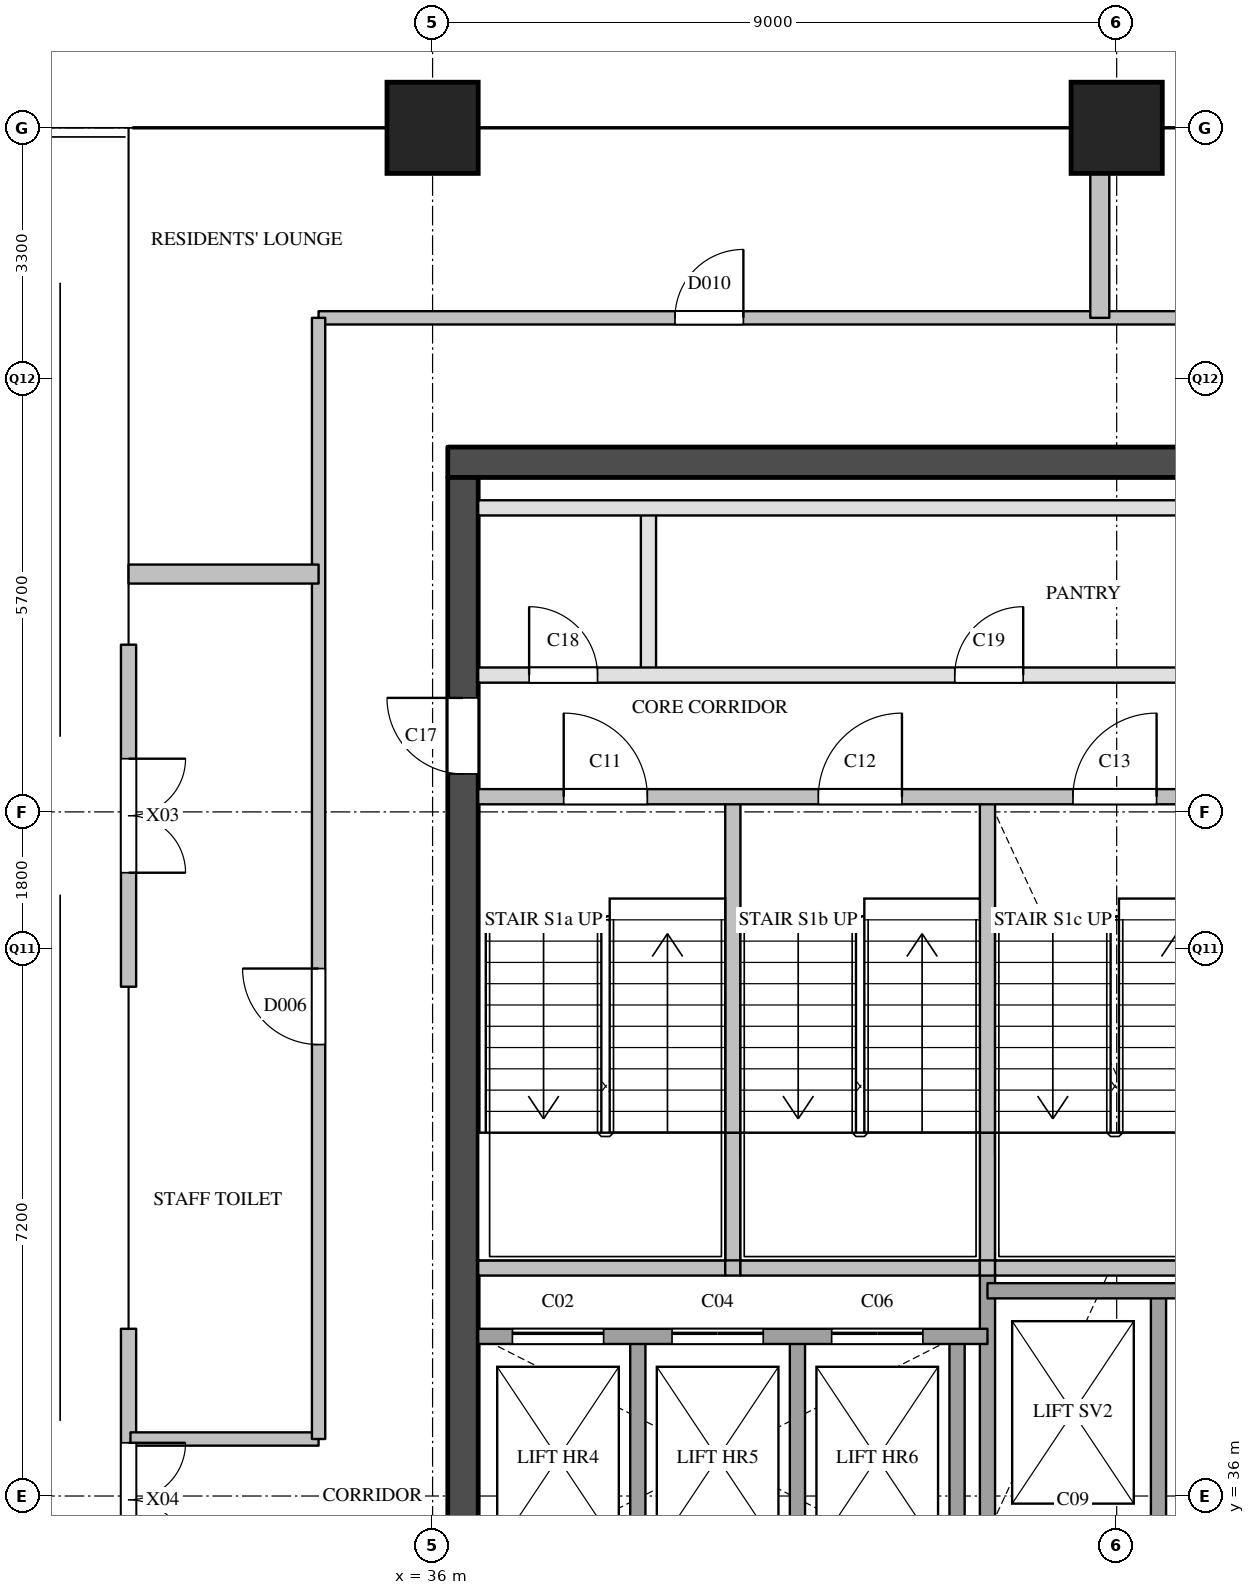
"""IFC4 building model, lengths in metres.
Left out: names, types, materials, properties, quantities, classifications, styles, units other than length and angle.
Written with IfcOpenShell. Run it as: python <this file> out.ifc"""

import sys

from ifc_helpers import new_model, si_unit, direction, frame, frame_2d, origin, origin_2d, place, context, subcontext, project, spatial, rectangle, extrude, element, fill, save


model = new_model("IFC4")
c1 = context("Model", 3, precision=1e-05, world=origin(), true_north=direction((0.0, 1.0)))
c2 = subcontext(c1, "Body", "Model", "MODEL_VIEW")
j1 = project(units=[si_unit("LENGTHUNIT", "METRE"), si_unit("PLANEANGLEUNIT", "RADIAN")], contexts=[c1])
p1 = place(None, origin())
s1 = spatial("IfcSite", under=j1, at=p1, CompositionType="ELEMENT")
p2 = place(p1, origin())
s2 = spatial("IfcBuilding", under=s1, at=p2, CompositionType="ELEMENT")
p3 = place(p2, frame((0.0, 0.0, 203.3)))
s3 = spatial("IfcBuildingStorey", under=s2, at=p3, CompositionType="ELEMENT", Elevation=203.3)
for number, where, z_axis, x_axis in (
    (1, (36.0, 54.0, 0.0), (0.0, 0.0, 1.0), (1.0, 0.0, 0.0)),
    (2, (45.0, 54.0, 0.0), (0.0, 0.0, 1.0), (1.0, 0.0, 0.0)),
):
    element("IfcColumn", number, at=place(p3, frame(where, z_axis=z_axis, x_axis=x_axis)), inside=s3, PredefinedType="COLUMN", context=c2, shape_type="SweptSolid", body=[
        extrude(rectangle(XDim=1.2, YDim=1.2, at=origin_2d()), origin(), (0.0, 0.0, 1.0), 3.9),
    ])
p4 = place(p3, frame((32.0, 47.2, 0.0), z_axis=(0.0, 0.0, 1.0), x_axis=(0.0, -1.0, 0.0)))
e3 = element("IfcWall", 3, at=p4, inside=s3, PredefinedType="SOLIDWALL", context=c2, shape_type="SweptSolid", body=[
    extrude(rectangle(XDim=4.5, YDim=0.2, at=frame_2d((2.25, 0.0))), origin(), (0.0, 0.0, 1.0), 2.6),
])
p5 = place(p4, frame((1.5, 0.0, 0.0)))
e4 = element("IfcOpeningElement", 4, at=p5, cuts=e3, PredefinedType="OPENING", context=c2, shape_type="SweptSolid", body=[
    extrude(rectangle(XDim=1.5, YDim=2.1, at=frame_2d((0.75, 1.05))), frame((0.0, 0.11, 0.0), z_axis=(0.0, -1.0, 0.0), x_axis=(1.0, 0.0, 0.0)), (0.0, 0.0, 1.0), 0.22),
])
p6 = place(p3, frame((32.0, 38.2, 0.0), z_axis=(0.0, 0.0, 1.0), x_axis=(0.0, -1.0, 0.0)))
e5 = element("IfcWall", 5, at=p6, inside=s3, PredefinedType="SOLIDWALL", context=c2, shape_type="SweptSolid", body=[
    extrude(rectangle(XDim=4.5, YDim=0.2, at=frame_2d((2.25, 0.0))), origin(), (0.0, 0.0, 1.0), 2.6),
])
p7 = place(p6, frame((1.5, 0.0, 0.0)))
e6 = element("IfcOpeningElement", 6, at=p7, cuts=e5, PredefinedType="OPENING", context=c2, shape_type="SweptSolid", body=[
    extrude(rectangle(XDim=1.5, YDim=2.1, at=frame_2d((0.75, 1.05))), frame((0.0, 0.11, 0.0), z_axis=(0.0, -1.0, 0.0), x_axis=(1.0, 0.0, 0.0)), (0.0, 0.0, 1.0), 0.22),
])
p8 = place(p3, frame((36.2, 49.6, 0.0), z_axis=(0.0, 0.0, 1.0), x_axis=(1.0, 0.0, 0.0)))
e7 = element("IfcWall", 7, at=p8, inside=s3, PredefinedType="SHEAR", context=c2, shape_type="SweptSolid", body=[
    extrude(rectangle(XDim=12.0, YDim=0.4, at=frame_2d((6.0, 0.0))), origin(), (0.0, 0.0, 1.0), 3.6),
])
p9 = place(p3, frame((36.4, 29.1, 0.0), z_axis=(0.0, 0.0, 1.0), x_axis=(0.0, 1.0, 0.0)))
e8 = element("IfcWall", 8, at=p9, inside=s3, PredefinedType="SHEAR", context=c2, shape_type="SweptSolid", body=[
    extrude(rectangle(XDim=20.3, YDim=0.4, at=frame_2d((10.15, 0.0))), origin(), (0.0, 0.0, 1.0), 3.6),
])
p10 = place(p9, frame((3.6, 0.0, 0.0)))
e9 = element("IfcOpeningElement", 9, at=p10, cuts=e8, PredefinedType="OPENING", context=c2, shape_type="SweptSolid", body=[
    extrude(rectangle(XDim=1.8, YDim=2.1, at=frame_2d((0.9, 1.05))), frame((0.0, 0.21, 0.0), z_axis=(0.0, -1.0, 0.0), x_axis=(1.0, 0.0, 0.0)), (0.0, 0.0, 1.0), 0.42),
])
p11 = place(p9, frame((16.4, 0.0, 0.0)))
e10 = element("IfcOpeningElement", 10, at=p11, cuts=e8, PredefinedType="OPENING", context=c2, shape_type="SweptSolid", body=[
    extrude(rectangle(XDim=1.0, YDim=2.1, at=frame_2d((0.5, 1.05))), frame((0.0, 0.21, 0.0), z_axis=(0.0, -1.0, 0.0), x_axis=(1.0, 0.0, 0.0)), (0.0, 0.0, 1.0), 0.42),
])
p12 = place(p3, frame((38.7, 34.9, 0.0), z_axis=(0.0, 0.0, 1.0), x_axis=(0.0, 1.0, 0.0)))
e11 = element("IfcWall", 11, at=p12, inside=s3, PredefinedType="SOLIDWALL", context=c2, shape_type="SweptSolid", body=[
    extrude(rectangle(XDim=3.2, YDim=0.2, at=frame_2d((1.6, 0.0))), origin(), (0.0, 0.0, 1.0), 3.6),
])
p13 = place(p3, frame((38.84, 46.8, 0.0), z_axis=(0.0, 0.0, 1.0), x_axis=(0.0, 1.0, 0.0)))
e12 = element("IfcWall", 12, at=p13, inside=s3, PredefinedType="PARTITIONING", context=c2, shape_type="SweptSolid", body=[
    extrude(rectangle(XDim=2.2, YDim=0.2, at=frame_2d((1.1, 0.0))), origin(), (0.0, 0.0, 1.0), 3.6),
])
p14 = place(p3, frame((39.95, 39.0, 0.0), z_axis=(0.0, 0.0, 1.0), x_axis=(0.0, 1.0, 0.0)))
e13 = element("IfcWall", 13, at=p14, inside=s3, PredefinedType="SOLIDWALL", context=c2, shape_type="SweptSolid", body=[
    extrude(rectangle(XDim=1.78, YDim=0.2, at=frame_2d((0.89, 0.0))), origin(), (0.0, 0.0, 1.0), 3.6),
])
p15 = place(p3, frame((39.95, 40.78, 0.0), z_axis=(0.0, 0.0, 1.0), x_axis=(0.0, 1.0, 0.0)))
e14 = element("IfcWall", 14, at=p15, inside=s3, PredefinedType="SOLIDWALL", context=c2, shape_type="SweptSolid", body=[
    extrude(rectangle(XDim=4.42, YDim=0.2, at=frame_2d((2.21, 0.0))), origin(), (0.0, 0.0, 1.0), 3.6),
])
for number, where, z_axis, x_axis in (
    (15, (40.8, 34.9, 0.0), (0.0, 0.0, 1.0), (0.0, 1.0, 0.0)),
    (16, (42.9, 34.9, 0.0), (0.0, 0.0, 1.0), (0.0, 1.0, 0.0)),
):
    element("IfcWall", number, at=place(p3, frame(where, z_axis=z_axis, x_axis=x_axis)), inside=s3, PredefinedType="SOLIDWALL", context=c2, shape_type="SweptSolid", body=[
        extrude(rectangle(XDim=3.2, YDim=0.2, at=frame_2d((1.6, 0.0))), origin(), (0.0, 0.0, 1.0), 3.6),
    ])
p16 = place(p3, frame((43.3, 29.1, 0.0), z_axis=(0.0, 0.0, 1.0), x_axis=(0.0, 1.0, 0.0)))
e17 = element("IfcWall", 17, at=p16, inside=s3, PredefinedType="SOLIDWALL", context=c2, shape_type="SweptSolid", body=[
    extrude(rectangle(XDim=9.9, YDim=0.2, at=frame_2d((4.95, 0.0))), origin(), (0.0, 0.0, 1.0), 3.6),
])
p17 = place(p3, frame((43.3, 39.0, 0.0), z_axis=(0.0, 0.0, 1.0), x_axis=(0.0, 1.0, 0.0)))
e18 = element("IfcWall", 18, at=p17, inside=s3, PredefinedType="SOLIDWALL", context=c2, shape_type="SweptSolid", body=[
    extrude(rectangle(XDim=1.78, YDim=0.2, at=frame_2d((0.89, 0.0))), origin(), (0.0, 0.0, 1.0), 3.6),
])
p18 = place(p3, frame((43.3, 40.78, 0.0), z_axis=(0.0, 0.0, 1.0), x_axis=(0.0, 1.0, 0.0)))
e19 = element("IfcWall", 19, at=p18, inside=s3, PredefinedType="SOLIDWALL", context=c2, shape_type="SweptSolid", body=[
    extrude(rectangle(XDim=4.42, YDim=0.2, at=frame_2d((2.21, 0.0))), origin(), (0.0, 0.0, 1.0), 3.6),
])
p19 = place(p3, frame((45.55, 35.5, 0.0), z_axis=(0.0, 0.0, 1.0), x_axis=(0.0, 1.0, 0.0)))
e20 = element("IfcWall", 20, at=p19, inside=s3, PredefinedType="SOLIDWALL", context=c2, shape_type="SweptSolid", body=[
    extrude(rectangle(XDim=3.2, YDim=0.2, at=frame_2d((1.6, 0.0))), origin(), (0.0, 0.0, 1.0), 3.6),
])
p20 = place(p3, frame((36.6, 38.1, 0.0), z_axis=(0.0, 0.0, 1.0), x_axis=(1.0, 0.0, 0.0)))
e21 = element("IfcWall", 21, at=p20, inside=s3, PredefinedType="SOLIDWALL", context=c2, shape_type="SweptSolid", body=[
    extrude(rectangle(XDim=6.7, YDim=0.2, at=frame_2d((3.35, 0.0))), origin(), (0.0, 0.0, 1.0), 3.6),
])
p21 = place(p20, frame((0.45, 0.0, 0.0)))
e22 = element("IfcOpeningElement", 22, at=p21, cuts=e21, PredefinedType="OPENING", context=c2, shape_type="SweptSolid", body=[
    extrude(rectangle(XDim=1.2, YDim=2.1, at=frame_2d((0.6, 1.05))), frame((0.0, 0.11, 0.0), z_axis=(0.0, -1.0, 0.0), x_axis=(1.0, 0.0, 0.0)), (0.0, 0.0, 1.0), 0.22),
])
p22 = place(p20, frame((2.55, 0.0, 0.0)))
e23 = element("IfcOpeningElement", 23, at=p22, cuts=e21, PredefinedType="OPENING", context=c2, shape_type="SweptSolid", body=[
    extrude(rectangle(XDim=1.2, YDim=2.1, at=frame_2d((0.6, 1.05))), frame((0.0, 0.11, 0.0), z_axis=(0.0, -1.0, 0.0), x_axis=(1.0, 0.0, 0.0)), (0.0, 0.0, 1.0), 0.22),
])
p23 = place(p20, frame((4.65, 0.0, 0.0)))
e24 = element("IfcOpeningElement", 24, at=p23, cuts=e21, PredefinedType="OPENING", context=c2, shape_type="SweptSolid", body=[
    extrude(rectangle(XDim=1.2, YDim=2.1, at=frame_2d((0.6, 1.05))), frame((0.0, 0.11, 0.0), z_axis=(0.0, -1.0, 0.0), x_axis=(1.0, 0.0, 0.0)), (0.0, 0.0, 1.0), 0.22),
])
p24 = place(p3, frame((43.3, 38.7, 0.0), z_axis=(0.0, 0.0, 1.0), x_axis=(1.0, 0.0, 0.0)))
e25 = element("IfcWall", 25, at=p24, inside=s3, PredefinedType="SOLIDWALL", context=c2, shape_type="SweptSolid", body=[
    extrude(rectangle(XDim=4.5, YDim=0.2, at=frame_2d((2.25, 0.0))), origin(), (0.0, 0.0, 1.0), 3.6),
])
p25 = place(p3, frame((36.6, 39.0, 0.0), z_axis=(0.0, 0.0, 1.0), x_axis=(1.0, 0.0, 0.0)))
e26 = element("IfcWall", 26, at=p25, inside=s3, PredefinedType="SOLIDWALL", context=c2, shape_type="SweptSolid", body=[
    extrude(rectangle(XDim=3.25, YDim=0.2, at=frame_2d((1.625, 0.0))), origin(), (0.0, 0.0, 1.0), 3.6),
])
p26 = place(p3, frame((39.85, 39.0, 0.0), z_axis=(0.0, 0.0, 1.0), x_axis=(1.0, 0.0, 0.0)))
e27 = element("IfcWall", 27, at=p26, inside=s3, PredefinedType="SOLIDWALL", context=c2, shape_type="SweptSolid", body=[
    extrude(rectangle(XDim=0.2, YDim=0.2, at=frame_2d((0.1, 0.0))), origin(), (0.0, 0.0, 1.0), 3.6),
])
p27 = place(p3, frame((40.05, 39.0, 0.0), z_axis=(0.0, 0.0, 1.0), x_axis=(1.0, 0.0, 0.0)))
e28 = element("IfcWall", 28, at=p27, inside=s3, PredefinedType="SOLIDWALL", context=c2, shape_type="SweptSolid", body=[
    extrude(rectangle(XDim=3.15, YDim=0.2, at=frame_2d((1.575, 0.0))), origin(), (0.0, 0.0, 1.0), 3.6),
])
p28 = place(p3, frame((43.2, 39.0, 0.0), z_axis=(0.0, 0.0, 1.0), x_axis=(1.0, 0.0, 0.0)))
e29 = element("IfcWall", 29, at=p28, inside=s3, PredefinedType="SOLIDWALL", context=c2, shape_type="SweptSolid", body=[
    extrude(rectangle(XDim=0.2, YDim=0.2, at=frame_2d((0.1, 0.0))), origin(), (0.0, 0.0, 1.0), 3.6),
])
p29 = place(p3, frame((43.4, 39.0, 0.0), z_axis=(0.0, 0.0, 1.0), x_axis=(1.0, 0.0, 0.0)))
e30 = element("IfcWall", 30, at=p29, inside=s3, PredefinedType="SOLIDWALL", context=c2, shape_type="SweptSolid", body=[
    extrude(rectangle(XDim=3.25, YDim=0.2, at=frame_2d((1.625, 0.0))), origin(), (0.0, 0.0, 1.0), 3.6),
])
p30 = place(p3, frame((36.6, 45.2, 0.0), z_axis=(0.0, 0.0, 1.0), x_axis=(1.0, 0.0, 0.0)))
e31 = element("IfcWall", 31, at=p30, inside=s3, PredefinedType="SOLIDWALL", context=c2, shape_type="SweptSolid", body=[
    extrude(rectangle(XDim=10.05, YDim=0.2, at=frame_2d((5.025, 0.0))), origin(), (0.0, 0.0, 1.0), 3.6),
])
p31 = place(p30, frame((1.125, 0.0, 0.0)))
e32 = element("IfcOpeningElement", 32, at=p31, cuts=e31, PredefinedType="OPENING", context=c2, shape_type="SweptSolid", body=[
    extrude(rectangle(XDim=1.1, YDim=2.1, at=frame_2d((0.55, 1.05))), frame((0.0, 0.11, 0.0), z_axis=(0.0, -1.0, 0.0), x_axis=(1.0, 0.0, 0.0)), (0.0, 0.0, 1.0), 0.22),
])
p32 = place(p30, frame((4.475, 0.0, 0.0)))
e33 = element("IfcOpeningElement", 33, at=p32, cuts=e31, PredefinedType="OPENING", context=c2, shape_type="SweptSolid", body=[
    extrude(rectangle(XDim=1.1, YDim=2.1, at=frame_2d((0.55, 1.05))), frame((0.0, 0.11, 0.0), z_axis=(0.0, -1.0, 0.0), x_axis=(1.0, 0.0, 0.0)), (0.0, 0.0, 1.0), 0.22),
])
p33 = place(p30, frame((7.825, 0.0, 0.0)))
e34 = element("IfcOpeningElement", 34, at=p33, cuts=e31, PredefinedType="OPENING", context=c2, shape_type="SweptSolid", body=[
    extrude(rectangle(XDim=1.1, YDim=2.1, at=frame_2d((0.55, 1.05))), frame((0.0, 0.11, 0.0), z_axis=(0.0, -1.0, 0.0), x_axis=(1.0, 0.0, 0.0)), (0.0, 0.0, 1.0), 0.22),
])
p34 = place(p3, frame((36.6, 46.8, 0.0), z_axis=(0.0, 0.0, 1.0), x_axis=(1.0, 0.0, 0.0)))
e35 = element("IfcWall", 35, at=p34, inside=s3, PredefinedType="PARTITIONING", context=c2, shape_type="SweptSolid", body=[
    extrude(rectangle(XDim=11.2, YDim=0.2, at=frame_2d((5.6, 0.0))), origin(), (0.0, 0.0, 1.0), 3.6),
])
p35 = place(p34, frame((0.67, 0.0, 0.0)))
e36 = element("IfcOpeningElement", 36, at=p35, cuts=e35, PredefinedType="OPENING", context=c2, shape_type="SweptSolid", body=[
    extrude(rectangle(XDim=0.9, YDim=2.1, at=frame_2d((0.45, 1.05))), frame((0.0, 0.11, 0.0), z_axis=(0.0, -1.0, 0.0), x_axis=(1.0, 0.0, 0.0)), (0.0, 0.0, 1.0), 0.22),
])
p36 = place(p34, frame((6.27, 0.0, 0.0)))
e37 = element("IfcOpeningElement", 37, at=p36, cuts=e35, PredefinedType="OPENING", context=c2, shape_type="SweptSolid", body=[
    extrude(rectangle(XDim=0.9, YDim=2.1, at=frame_2d((0.45, 1.05))), frame((0.0, 0.11, 0.0), z_axis=(0.0, -1.0, 0.0), x_axis=(1.0, 0.0, 0.0)), (0.0, 0.0, 1.0), 0.22),
])
p37 = place(p3, frame((36.6, 49.0, 0.0), z_axis=(0.0, 0.0, 1.0), x_axis=(1.0, 0.0, 0.0)))
e38 = element("IfcWall", 38, at=p37, inside=s3, PredefinedType="PARTITIONING", context=c2, shape_type="SweptSolid", body=[
    extrude(rectangle(XDim=11.2, YDim=0.2, at=frame_2d((5.6, 0.0))), origin(), (0.0, 0.0, 1.0), 3.6),
])
p38 = place(p3, frame((32.025, 36.75, 0.0), z_axis=(0.0, 0.0, 1.0), x_axis=(1.0, 0.0, 0.0)))
e39 = element("IfcWall", 39, at=p38, inside=s3, PredefinedType="PARTITIONING", context=c2, shape_type="SweptSolid", body=[
    extrude(rectangle(XDim=2.475, YDim=0.175, at=frame_2d((1.237, 0.0))), origin(), (0.0, 0.0, 1.0), 3.6),
])
p39 = place(p3, frame((34.5, 51.5, 0.0), z_axis=(0.0, 0.0, 1.0), x_axis=(1.0, 0.0, 0.0)))
e40 = element("IfcWall", 40, at=p39, inside=s3, PredefinedType="PARTITIONING", context=c2, shape_type="SweptSolid", body=[
    extrude(rectangle(XDim=15.4, YDim=0.175, at=frame_2d((7.7, 0.0))), origin(), (0.0, 0.0, 1.0), 3.6),
])
p40 = place(p39, frame((4.689, 0.0, 0.0)))
e41 = element("IfcOpeningElement", 41, at=p40, cuts=e40, PredefinedType="OPENING", context=c2, shape_type="SweptSolid", body=[
    extrude(rectangle(XDim=0.9, YDim=2.1, at=frame_2d((0.45, 1.05))), frame((0.0, 0.097, 0.0), z_axis=(0.0, -1.0, 0.0), x_axis=(1.0, 0.0, 0.0)), (0.0, 0.0, 1.0), 0.195),
])
p41 = place(p3, frame((34.5, 36.75, 0.0), z_axis=(0.0, 0.0, 1.0), x_axis=(0.0, 1.0, 0.0)))
e42 = element("IfcWall", 42, at=p41, inside=s3, PredefinedType="PARTITIONING", context=c2, shape_type="SweptSolid", body=[
    extrude(rectangle(XDim=14.75, YDim=0.175, at=frame_2d((7.375, 0.0))), origin(), (0.0, 0.0, 1.0), 3.6),
])
p42 = place(p41, frame((5.189, 0.0, 0.0)))
e43 = element("IfcOpeningElement", 43, at=p42, cuts=e42, PredefinedType="OPENING", context=c2, shape_type="SweptSolid", body=[
    extrude(rectangle(XDim=1.0, YDim=2.1, at=frame_2d((0.5, 1.05))), frame((0.0, 0.097, 0.0), z_axis=(0.0, -1.0, 0.0), x_axis=(1.0, 0.0, 0.0)), (0.0, 0.0, 1.0), 0.195),
])
for number, where, z_axis, x_axis in (
    (44, (32.0, 48.129, 0.0), (0.0, 0.0, 1.0), (1.0, 0.0, 0.0)),
    (45, (44.778, 51.5, 0.0), (0.0, 0.0, 1.0), (0.0, 1.0, 0.0)),
):
    element("IfcWall", number, at=place(p3, frame(where, z_axis=z_axis, x_axis=x_axis)), inside=s3, PredefinedType="PARTITIONING", context=c2, shape_type="SweptSolid", body=[
        extrude(rectangle(XDim=2.5, YDim=0.25, at=frame_2d((1.25, 0.0))), origin(), (0.0, 0.0, 1.0), 3.6),
    ])
p43 = place(p5, origin())
e46 = element("IfcDoor", 46, at=p43, inside=s3, OperationType="DOUBLE_DOOR_SINGLE_SWING", PredefinedType="DOOR", context=c2, shape_type="SweptSolid", body=[
    extrude(rectangle(XDim=1.5, YDim=2.1, at=frame_2d((0.75, 1.05))), frame((0.0, 0.025, 0.0), z_axis=(0.0, -1.0, 0.0), x_axis=(1.0, 0.0, 0.0)), (0.0, 0.0, 1.0), 0.05),
])
fill(e4, e46)
p44 = place(p7, origin())
e47 = element("IfcDoor", 47, at=p44, inside=s3, OperationType="DOUBLE_DOOR_SINGLE_SWING", PredefinedType="DOOR", context=c2, shape_type="SweptSolid", body=[
    extrude(rectangle(XDim=1.5, YDim=2.1, at=frame_2d((0.75, 1.05))), frame((0.0, 0.025, 0.0), z_axis=(0.0, -1.0, 0.0), x_axis=(1.0, 0.0, 0.0)), (0.0, 0.0, 1.0), 0.05),
])
fill(e6, e47)
p45 = place(p21, origin())
e48 = element("IfcDoor", 48, at=p45, inside=s3, OperationType="SLIDING_TO_LEFT", PredefinedType="DOOR", context=c2, shape_type="SweptSolid", body=[
    extrude(rectangle(XDim=1.2, YDim=2.1, at=frame_2d((0.6, 1.05))), frame((0.0, 0.025, 0.0), z_axis=(0.0, -1.0, 0.0), x_axis=(1.0, 0.0, 0.0)), (0.0, 0.0, 1.0), 0.05),
])
fill(e22, e48)
p46 = place(p22, origin())
e49 = element("IfcDoor", 49, at=p46, inside=s3, OperationType="SLIDING_TO_LEFT", PredefinedType="DOOR", context=c2, shape_type="SweptSolid", body=[
    extrude(rectangle(XDim=1.2, YDim=2.1, at=frame_2d((0.6, 1.05))), frame((0.0, 0.025, 0.0), z_axis=(0.0, -1.0, 0.0), x_axis=(1.0, 0.0, 0.0)), (0.0, 0.0, 1.0), 0.05),
])
fill(e23, e49)
p47 = place(p23, origin())
e50 = element("IfcDoor", 50, at=p47, inside=s3, OperationType="SLIDING_TO_LEFT", PredefinedType="DOOR", context=c2, shape_type="SweptSolid", body=[
    extrude(rectangle(XDim=1.2, YDim=2.1, at=frame_2d((0.6, 1.05))), frame((0.0, 0.025, 0.0), z_axis=(0.0, -1.0, 0.0), x_axis=(1.0, 0.0, 0.0)), (0.0, 0.0, 1.0), 0.05),
])
fill(e24, e50)
p48 = place(p31, origin())
e51 = element("IfcDoor", 51, at=p48, inside=s3, OperationType="SINGLE_SWING_LEFT", PredefinedType="DOOR", context=c2, shape_type="SweptSolid", body=[
    extrude(rectangle(XDim=1.1, YDim=2.1, at=frame_2d((0.55, 1.05))), frame((0.0, 0.025, 0.0), z_axis=(0.0, -1.0, 0.0), x_axis=(1.0, 0.0, 0.0)), (0.0, 0.0, 1.0), 0.05),
])
fill(e32, e51)
p49 = place(p32, origin())
e52 = element("IfcDoor", 52, at=p49, inside=s3, OperationType="SINGLE_SWING_RIGHT", PredefinedType="DOOR", context=c2, shape_type="SweptSolid", body=[
    extrude(rectangle(XDim=1.1, YDim=2.1, at=frame_2d((0.55, 1.05))), frame((0.0, 0.025, 0.0), z_axis=(0.0, -1.0, 0.0), x_axis=(1.0, 0.0, 0.0)), (0.0, 0.0, 1.0), 0.05),
])
fill(e33, e52)
p50 = place(p33, origin())
e53 = element("IfcDoor", 53, at=p50, inside=s3, OperationType="SINGLE_SWING_RIGHT", PredefinedType="DOOR", context=c2, shape_type="SweptSolid", body=[
    extrude(rectangle(XDim=1.1, YDim=2.1, at=frame_2d((0.55, 1.05))), frame((0.0, 0.025, 0.0), z_axis=(0.0, -1.0, 0.0), x_axis=(1.0, 0.0, 0.0)), (0.0, 0.0, 1.0), 0.05),
])
fill(e34, e53)
p51 = place(p11, origin())
e54 = element("IfcDoor", 54, at=p51, inside=s3, OperationType="SINGLE_SWING_RIGHT", PredefinedType="DOOR", context=c2, shape_type="SweptSolid", body=[
    extrude(rectangle(XDim=1.0, YDim=2.1, at=frame_2d((0.5, 1.05))), frame((0.0, 0.025, 0.0), z_axis=(0.0, -1.0, 0.0), x_axis=(1.0, 0.0, 0.0)), (0.0, 0.0, 1.0), 0.05),
])
fill(e10, e54)
p52 = place(p35, origin())
e55 = element("IfcDoor", 55, at=p52, inside=s3, OperationType="SINGLE_SWING_LEFT", PredefinedType="DOOR", context=c2, shape_type="SweptSolid", body=[
    extrude(rectangle(XDim=0.9, YDim=2.1, at=frame_2d((0.45, 1.05))), frame((0.0, 0.025, 0.0), z_axis=(0.0, -1.0, 0.0), x_axis=(1.0, 0.0, 0.0)), (0.0, 0.0, 1.0), 0.05),
])
fill(e36, e55)
p53 = place(p36, origin())
e56 = element("IfcDoor", 56, at=p53, inside=s3, OperationType="SINGLE_SWING_RIGHT", PredefinedType="DOOR", context=c2, shape_type="SweptSolid", body=[
    extrude(rectangle(XDim=0.9, YDim=2.1, at=frame_2d((0.45, 1.05))), frame((0.0, 0.025, 0.0), z_axis=(0.0, -1.0, 0.0), x_axis=(1.0, 0.0, 0.0)), (0.0, 0.0, 1.0), 0.05),
])
fill(e37, e56)
p54 = place(p42, origin())
e57 = element("IfcDoor", 57, at=p54, inside=s3, OperationType="SINGLE_SWING_RIGHT", PredefinedType="DOOR", context=c2, shape_type="SweptSolid", body=[
    extrude(rectangle(XDim=1.0, YDim=2.1, at=frame_2d((0.5, 1.05))), frame((0.0, 0.025, 0.0), z_axis=(0.0, -1.0, 0.0), x_axis=(1.0, 0.0, 0.0)), (0.0, 0.0, 1.0), 0.05),
])
fill(e43, e57)
p55 = place(p40, origin())
e58 = element("IfcDoor", 58, at=p55, inside=s3, OperationType="SINGLE_SWING_RIGHT", PredefinedType="DOOR", context=c2, shape_type="SweptSolid", body=[
    extrude(rectangle(XDim=0.9, YDim=2.1, at=frame_2d((0.45, 1.05))), frame((0.0, 0.025, 0.0), z_axis=(0.0, -1.0, 0.0), x_axis=(1.0, 0.0, 0.0)), (0.0, 0.0, 1.0), 0.05),
])
fill(e41, e58)
save(model, sys.argv[1])
